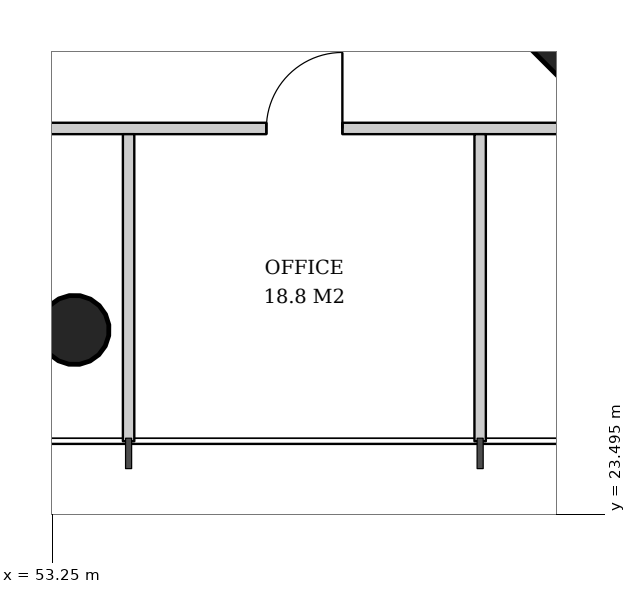
"""IFC4 building model, lengths in metres.
Left out: names, types, materials, properties, quantities, classifications, styles, units other than length and angle.
Written with IfcOpenShell. Run it as: python <this file> out.ifc"""

import sys

from ifc_helpers import new_model, si_unit, direction, frame, frame_2d, origin, origin_2d, place, context, subcontext, project, spatial, rectangle, hollow_circle, extrude, element, fill, save


model = new_model("IFC4")
c1 = context("Model", 3, precision=1e-05, world=origin(), true_north=direction((0.0, 1.0)))
c2 = subcontext(c1, "Body", "Model", "MODEL_VIEW")
j1 = project(units=[si_unit("LENGTHUNIT", "METRE"), si_unit("PLANEANGLEUNIT", "RADIAN")], contexts=[c1])
p1 = place(None, origin())
s1 = spatial("IfcSite", under=j1, at=p1, CompositionType="ELEMENT")
p2 = place(p1, origin())
s2 = spatial("IfcBuilding", under=s1, at=p2, CompositionType="ELEMENT")
p3 = place(p2, frame((0.0, 0.0, 142.6)))
s3 = spatial("IfcBuildingStorey", under=s2, at=p3, CompositionType="ELEMENT", Elevation=142.6)
p4 = place(p3, frame((61.014, 29.986, 0.0), z_axis=(-0.031964207655, 0.031964207655, 0.998977766949), x_axis=(-0.707106781187, -0.707106781187, 0.0)))
e1 = element("IfcColumn", 1, at=p4, inside=s3, PredefinedType="COLUMN", context=c2, shape_type="SweptSolid", body=[
    extrude(rectangle(XDim=2.6, YDim=2.6, at=origin_2d()), origin(), (0.0, 0.0, 1.0), 3.804),
])
p5 = place(p3, frame((53.557, 25.886, 0.0), z_axis=(-0.01598826355, 0.031912317206, 0.999362786699), x_axis=(-0.894067115991, -0.447933021895, 0.0)))
e2 = element("IfcColumn", 2, at=p5, inside=s3, PredefinedType="COLUMN", context=c2, shape_type="SweptSolid", body=[
    extrude(hollow_circle(Radius=0.457, WallThickness=0.03, at=origin_2d()), origin(), (0.0, 0.0, 1.0), 3.802),
])
p6 = place(p3, frame((29.489, 28.575, 0.0), z_axis=(0.0, 0.0, 1.0), x_axis=(1.0, 0.0, 0.0)))
e3 = element("IfcWall", 3, at=p6, inside=s3, PredefinedType="PARTITIONING", context=c2, shape_type="SweptSolid", body=[
    extrude(rectangle(XDim=31.023, YDim=0.15, at=frame_2d((15.511, 0.0))), origin(), (0.0, 0.0, 1.0), 2.72),
])
p7 = place(p6, frame((3.449, 0.0, 0.0)))
e4 = element("IfcOpeningElement", 4, at=p7, cuts=e3, PredefinedType="OPENING", context=c2, shape_type="SweptSolid", body=[
    extrude(rectangle(XDim=1.0, YDim=2.1, at=frame_2d((0.5, 1.05))), frame((0.0, 0.085, 0.0), z_axis=(0.0, -1.0, 0.0), x_axis=(1.0, 0.0, 0.0)), (0.0, 0.0, 1.0), 0.17),
])
p8 = place(p6, frame((8.074, 0.0, 0.0)))
e5 = element("IfcOpeningElement", 5, at=p8, cuts=e3, PredefinedType="OPENING", context=c2, shape_type="SweptSolid", body=[
    extrude(rectangle(XDim=1.0, YDim=2.1, at=frame_2d((0.5, 1.05))), frame((0.0, 0.085, 0.0), z_axis=(0.0, -1.0, 0.0), x_axis=(1.0, 0.0, 0.0)), (0.0, 0.0, 1.0), 0.17),
])
p9 = place(p6, frame((12.699, 0.0, 0.0)))
e6 = element("IfcOpeningElement", 6, at=p9, cuts=e3, PredefinedType="OPENING", context=c2, shape_type="SweptSolid", body=[
    extrude(rectangle(XDim=1.0, YDim=2.1, at=frame_2d((0.5, 1.05))), frame((0.0, 0.085, 0.0), z_axis=(0.0, -1.0, 0.0), x_axis=(1.0, 0.0, 0.0)), (0.0, 0.0, 1.0), 0.17),
])
p10 = place(p6, frame((17.324, 0.0, 0.0)))
e7 = element("IfcOpeningElement", 7, at=p10, cuts=e3, PredefinedType="OPENING", context=c2, shape_type="SweptSolid", body=[
    extrude(rectangle(XDim=1.0, YDim=2.1, at=frame_2d((0.5, 1.05))), frame((0.0, 0.085, 0.0), z_axis=(0.0, -1.0, 0.0), x_axis=(1.0, 0.0, 0.0)), (0.0, 0.0, 1.0), 0.17),
])
p11 = place(p6, frame((21.949, 0.0, 0.0)))
e8 = element("IfcOpeningElement", 8, at=p11, cuts=e3, PredefinedType="OPENING", context=c2, shape_type="SweptSolid", body=[
    extrude(rectangle(XDim=1.0, YDim=2.1, at=frame_2d((0.5, 1.05))), frame((0.0, 0.085, 0.0), z_axis=(0.0, -1.0, 0.0), x_axis=(1.0, 0.0, 0.0)), (0.0, 0.0, 1.0), 0.17),
])
p12 = place(p6, frame((26.574, 0.0, 0.0)))
e9 = element("IfcOpeningElement", 9, at=p12, cuts=e3, PredefinedType="OPENING", context=c2, shape_type="SweptSolid", body=[
    extrude(rectangle(XDim=1.0, YDim=2.1, at=frame_2d((0.5, 1.05))), frame((0.0, 0.085, 0.0), z_axis=(0.0, -1.0, 0.0), x_axis=(1.0, 0.0, 0.0)), (0.0, 0.0, 1.0), 0.17),
])
for number, where, z_axis, x_axis in (
    (10, (54.25, 28.5, 0.0), (0.0, 0.0, 1.0), (0.0, -1.0, 0.0)),
    (11, (58.875, 28.5, 0.0), (0.0, 0.0, 1.0), (0.0, -1.0, 0.0)),
):
    element("IfcWall", number, at=place(p3, frame(where, z_axis=z_axis, x_axis=x_axis)), inside=s3, PredefinedType="PARTITIONING", context=c2, shape_type="SweptSolid", body=[
        extrude(rectangle(XDim=4.04, YDim=0.15, at=frame_2d((2.02, 0.0))), origin(), (0.0, 0.0, 1.0), 2.82),
    ])
p13 = place(p12, origin())
e12 = element("IfcDoor", 12, at=p13, inside=s3, OperationType="SINGLE_SWING_RIGHT", PredefinedType="DOOR", context=c2, shape_type="SweptSolid", body=[
    extrude(rectangle(XDim=1.0, YDim=2.1, at=frame_2d((0.5, 1.05))), frame((0.0, 0.025, 0.0), z_axis=(0.0, -1.0, 0.0), x_axis=(1.0, 0.0, 0.0)), (0.0, 0.0, 1.0), 0.05),
])
fill(e9, e12)
save(model, sys.argv[1])
